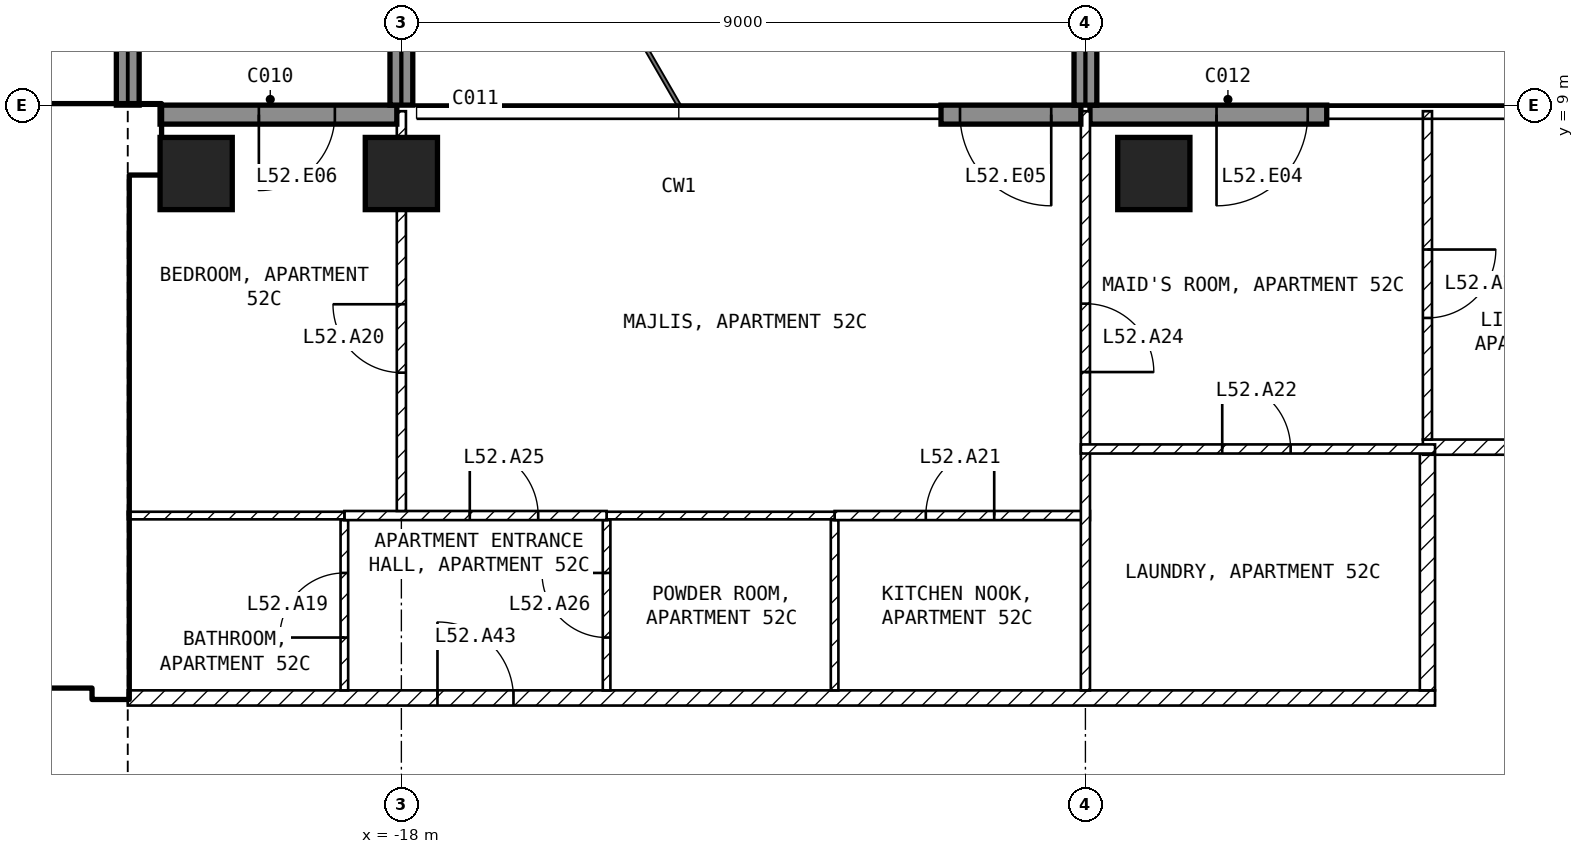
"""IFC4 building model, lengths in metres.
Left out: names, types, materials, properties, quantities, classifications, styles, units other than length and angle.
Written with IfcOpenShell. Run it as: python <this file> out.ifc"""

import sys

from ifc_helpers import new_model, si_unit, direction, frame, frame_2d, origin, origin_2d, place, context, subcontext, project, spatial, rectangle, extrude, element, fill, save


model = new_model("IFC4")
c1 = context("Model", 3, precision=1e-05, world=origin(), true_north=direction((0.0, 1.0)))
c2 = subcontext(c1, "Body", "Model", "MODEL_VIEW")
j1 = project(units=[si_unit("LENGTHUNIT", "METRE"), si_unit("PLANEANGLEUNIT", "RADIAN")], contexts=[c1])
p1 = place(None, origin())
s1 = spatial("IfcSite", under=j1, at=p1, CompositionType="ELEMENT")
p2 = place(p1, origin())
s2 = spatial("IfcBuilding", under=s1, at=p2, CompositionType="ELEMENT")
p3 = place(p2, frame((0.0, 0.0, 208.6)))
s3 = spatial("IfcBuildingStorey", under=s2, at=p3, CompositionType="ELEMENT", Elevation=208.6)
for number, where, z_axis, x_axis in (
    (1, (-20.7, 8.1, -0.25), (0.0, 0.0, 1.0), (1.0, 0.0, 0.0)),
    (2, (-18.0, 8.1, -0.25), (0.0, 0.0, 1.0), (1.0, 0.0, 0.0)),
    (3, (-8.1, 8.1, -0.25), (0.0, 0.0, 1.0), (1.0, 0.0, 0.0)),
):
    element("IfcColumn", number, at=place(p3, frame(where, z_axis=z_axis, x_axis=x_axis)), inside=s3, PredefinedType="COLUMN", context=c2, shape_type="SweptSolid", body=[
        extrude(rectangle(XDim=0.95, YDim=0.95, at=origin_2d()), origin(), (0.0, 0.0, 1.0), 3.5),
    ])
p4 = place(p3, frame((-5.825, 8.875, 0.0), z_axis=(0.0, 0.0, 1.0), x_axis=(-1.0, 0.0, 0.0)))
e4 = element("IfcWall", 4, at=p4, inside=s3, PredefinedType="SOLIDWALL", context=c2, shape_type="SweptSolid", body=[
    extrude(rectangle(XDim=3.115, YDim=0.25, at=frame_2d((1.558, 0.0))), origin(), (0.0, 0.0, 1.0), 3.25),
])
p5 = place(p4, frame((0.25, 0.0, 0.0)))
e5 = element("IfcOpeningElement", 5, at=p5, cuts=e4, PredefinedType="OPENING", context=c2, shape_type="SweptSolid", body=[
    extrude(rectangle(XDim=1.2, YDim=2.4, at=frame_2d((0.6, 1.2))), frame((0.0, 0.135, 0.0), z_axis=(0.0, -1.0, 0.0), x_axis=(1.0, 0.0, 0.0)), (0.0, 0.0, 1.0), 0.27),
])
p6 = place(p3, frame((-9.06, 8.875, 0.0), z_axis=(0.0, 0.0, 1.0), x_axis=(-1.0, 0.0, 0.0)))
e6 = element("IfcWall", 6, at=p6, inside=s3, PredefinedType="SOLIDWALL", context=c2, shape_type="SweptSolid", body=[
    extrude(rectangle(XDim=1.84, YDim=0.25, at=frame_2d((0.92, 0.0))), origin(), (0.0, 0.0, 1.0), 3.25),
])
p7 = place(p6, frame((0.39, 0.0, 0.0)))
e7 = element("IfcOpeningElement", 7, at=p7, cuts=e6, PredefinedType="OPENING", context=c2, shape_type="SweptSolid", body=[
    extrude(rectangle(XDim=1.2, YDim=2.4, at=frame_2d((0.6, 1.2))), frame((0.0, 0.135, 0.0), z_axis=(0.0, -1.0, 0.0), x_axis=(1.0, 0.0, 0.0)), (0.0, 0.0, 1.0), 0.27),
])
p8 = place(p3, frame((-18.06, 8.875, 0.0), z_axis=(0.0, 0.0, 1.0), x_axis=(-1.0, 0.0, 0.0)))
e8 = element("IfcWall", 8, at=p8, inside=s3, PredefinedType="SOLIDWALL", context=c2, shape_type="SweptSolid", body=[
    extrude(rectangle(XDim=3.115, YDim=0.25, at=frame_2d((1.558, 0.0))), origin(), (0.0, 0.0, 1.0), 3.25),
])
p9 = place(p8, frame((0.815, 0.0, 0.0)))
e9 = element("IfcOpeningElement", 9, at=p9, cuts=e8, PredefinedType="OPENING", context=c2, shape_type="SweptSolid", body=[
    extrude(rectangle(XDim=1.0, YDim=2.4, at=frame_2d((0.5, 1.2))), frame((0.0, 0.135, 0.0), z_axis=(0.0, -1.0, 0.0), x_axis=(1.0, 0.0, 0.0)), (0.0, 0.0, 1.0), 0.27),
])
for number, where, z_axis, x_axis in (
    (10, (-21.6, 9.0, 0.0), (0.0, 0.0, 1.0), (0.0, 1.0, 0.0)),
    (11, (-18.0, 9.0, 0.0), (0.0, 0.0, 1.0), (0.0, 1.0, 0.0)),
    (12, (-9.0, 9.0, 0.0), (0.0, 0.0, 1.0), (0.0, 1.0, 0.0)),
):
    element("IfcWall", number, at=place(p3, frame(where, z_axis=z_axis, x_axis=x_axis)), inside=s3, PredefinedType="SOLIDWALL", context=c2, shape_type="SweptSolid", body=[
        extrude(rectangle(XDim=2.7, YDim=0.3, at=frame_2d((1.35, 0.0))), origin(), (0.0, 0.0, 1.0), 3.25),
    ])
p10 = place(p3, frame((-29.6, 8.55, 0.0), z_axis=(0.0, 0.0, 1.0), x_axis=(1.0, 0.0, 0.0)))
e13 = element("IfcWall", 13, at=p10, inside=s3, PredefinedType="SHEAR", context=c2, shape_type="SweptSolid", body=[
    extrude(rectangle(XDim=8.425, YDim=0.9, at=frame_2d((4.212, 0.0))), origin(), (0.0, 0.0, 1.0), 3.25),
])
p11 = place(p3, frame((-21.825, 1.2, 0.0), z_axis=(0.0, 0.0, 1.0), x_axis=(0.0, 1.0, 0.0)))
e14 = element("IfcWall", 14, at=p11, inside=s3, PredefinedType="SHEAR", context=c2, shape_type="SweptSolid", body=[
    extrude(rectangle(XDim=6.9, YDim=0.45, at=frame_2d((3.45, 0.0))), origin(), (0.0, 0.0, 1.0), 3.25),
])
p12 = place(p3, frame((-33.2, 1.45, 0.0), z_axis=(0.0, 0.0, 1.0), x_axis=(1.0, 0.0, 0.0)))
e15 = element("IfcWall", 15, at=p12, inside=s3, PredefinedType="SOLIDWALL", context=c2, shape_type="SweptSolid", body=[
    extrude(rectangle(XDim=11.15, YDim=0.2, at=frame_2d((5.575, 0.0))), origin(), (0.0, 0.0, 1.0), 3.25),
])
p13 = place(p12, frame((9.4, 0.0, 0.0)))
e16 = element("IfcOpeningElement", 16, at=p13, cuts=e15, PredefinedType="OPENING", context=c2, shape_type="SweptSolid", body=[
    extrude(rectangle(XDim=1.0, YDim=2.1, at=frame_2d((0.5, 1.05))), frame((0.0, 0.11, 0.0), z_axis=(0.0, -1.0, 0.0), x_axis=(1.0, 0.0, 0.0)), (0.0, 0.0, 1.0), 0.22),
])
p14 = place(p12, frame((6.9, 0.0, 0.0)))
e17 = element("IfcOpeningElement", 17, at=p14, cuts=e15, PredefinedType="OPENING", context=c2, shape_type="SweptSolid", body=[
    extrude(rectangle(XDim=1.0, YDim=2.1, at=frame_2d((0.5, 1.05))), frame((0.0, 0.11, 0.0), z_axis=(0.0, -1.0, 0.0), x_axis=(1.0, 0.0, 0.0)), (0.0, 0.0, 1.0), 0.22),
])
p15 = place(p12, frame((1.1, 0.0, 0.0)))
e18 = element("IfcOpeningElement", 18, at=p15, cuts=e15, PredefinedType="OPENING", context=c2, shape_type="SweptSolid", body=[
    extrude(rectangle(XDim=0.9, YDim=2.1, at=frame_2d((0.45, 1.05))), frame((0.0, 0.11, 0.0), z_axis=(0.0, -1.0, 0.0), x_axis=(1.0, 0.0, 0.0)), (0.0, 0.0, 1.0), 0.22),
])
p16 = place(p3, frame((-28.35, 5.15, 0.0), z_axis=(0.0, 0.0, 1.0), x_axis=(1.0, 0.0, 0.0)))
e19 = element("IfcWall", 19, at=p16, inside=s3, PredefinedType="SOLIDWALL", context=c2, shape_type="SweptSolid", body=[
    extrude(rectangle(XDim=6.3, YDim=0.2, at=frame_2d((3.15, 0.0))), origin(), (0.0, 0.0, 1.0), 3.25),
])
p17 = place(p16, frame((5.1, 0.0, 0.0)))
e20 = element("IfcOpeningElement", 20, at=p17, cuts=e19, PredefinedType="OPENING", context=c2, shape_type="SweptSolid", body=[
    extrude(rectangle(XDim=1.0, YDim=2.1, at=frame_2d((0.5, 1.05))), frame((0.0, 0.11, 0.0), z_axis=(0.0, -1.0, 0.0), x_axis=(1.0, 0.0, 0.0)), (0.0, 0.0, 1.0), 0.22),
])
p18 = place(p3, frame((-21.6, 1.2, 0.0), z_axis=(0.0, 0.0, 1.0), x_axis=(1.0, 0.0, 0.0)))
e21 = element("IfcWall", 21, at=p18, inside=s3, PredefinedType="PARTITIONING", context=c2, shape_type="SweptSolid", body=[
    extrude(rectangle(XDim=17.2, YDim=0.2, at=frame_2d((8.6, 0.0))), origin(), (0.0, 0.0, 1.0), 3.25),
])
p19 = place(p18, frame((4.075, 0.0, 0.0)))
e22 = element("IfcOpeningElement", 22, at=p19, cuts=e21, PredefinedType="OPENING", context=c2, shape_type="SweptSolid", body=[
    extrude(rectangle(XDim=1.0, YDim=2.1, at=frame_2d((0.5, 1.05))), frame((0.0, 0.11, 0.0), z_axis=(0.0, -1.0, 0.0), x_axis=(1.0, 0.0, 0.0)), (0.0, 0.0, 1.0), 0.22),
])
p20 = place(p3, frame((-4.5, 1.3, 0.0), z_axis=(0.0, 0.0, 1.0), x_axis=(0.0, 1.0, 0.0)))
e23 = element("IfcWall", 23, at=p20, inside=s3, PredefinedType="PARTITIONING", context=c2, shape_type="SweptSolid", body=[
    extrude(rectangle(XDim=3.116, YDim=0.2, at=frame_2d((1.558, 0.0))), origin(), (0.0, 0.0, 1.0), 3.25),
])
p21 = place(p3, frame((-4.56, 4.5, 0.0), z_axis=(0.0, 0.0, 1.0), x_axis=(1.0, 0.0, 0.0)))
e24 = element("IfcWall", 24, at=p21, inside=s3, PredefinedType="PARTITIONING", context=c2, shape_type="SweptSolid", body=[
    extrude(rectangle(XDim=3.46, YDim=0.2, at=frame_2d((1.73, 0.0))), origin(), (0.0, 0.0, 1.0), 3.25),
])
p22 = place(p3, frame((-12.3, 1.3, 0.0), z_axis=(0.0, 0.0, 1.0), x_axis=(0.0, 1.0, 0.0)))
e25 = element("IfcWall", 25, at=p22, inside=s3, PredefinedType="PARTITIONING", context=c2, shape_type="SweptSolid", body=[
    extrude(rectangle(XDim=2.24, YDim=0.1, at=frame_2d((1.12, 0.0))), origin(), (0.0, 0.0, 1.0), 3.25),
])
p23 = place(p3, frame((-12.3, 3.6, 0.0), z_axis=(0.0, 0.0, 1.0), x_axis=(1.0, 0.0, 0.0)))
e26 = element("IfcWall", 26, at=p23, inside=s3, PredefinedType="PARTITIONING", context=c2, shape_type="SweptSolid", body=[
    extrude(rectangle(XDim=3.36, YDim=0.12, at=frame_2d((1.68, 0.0))), origin(), (0.0, 0.0, 1.0), 3.25),
])
p24 = place(p23, frame((1.2, 0.0, 0.0)))
e27 = element("IfcOpeningElement", 27, at=p24, cuts=e26, PredefinedType="OPENING", context=c2, shape_type="SweptSolid", body=[
    extrude(rectangle(XDim=0.9, YDim=2.1, at=frame_2d((0.45, 1.05))), frame((0.0, 0.07, 0.0), z_axis=(0.0, -1.0, 0.0), x_axis=(1.0, 0.0, 0.0)), (0.0, 0.0, 1.0), 0.14),
])
p25 = place(p3, frame((-9.0, 8.92, 0.0), z_axis=(0.0, 0.0, 1.0), x_axis=(0.0, -1.0, 0.0)))
e28 = element("IfcWall", 28, at=p25, inside=s3, PredefinedType="PARTITIONING", context=c2, shape_type="SweptSolid", body=[
    extrude(rectangle(XDim=7.62, YDim=0.12, at=frame_2d((3.81, 0.0))), origin(), (0.0, 0.0, 1.0), 3.25),
])
p26 = place(p25, frame((2.532, 0.0, 0.0)))
e29 = element("IfcOpeningElement", 29, at=p26, cuts=e28, PredefinedType="OPENING", context=c2, shape_type="SweptSolid", body=[
    extrude(rectangle(XDim=0.9, YDim=2.1, at=frame_2d((0.45, 1.05))), frame((0.0, 0.07, 0.0), z_axis=(0.0, -1.0, 0.0), x_axis=(1.0, 0.0, 0.0)), (0.0, 0.0, 1.0), 0.14),
])
p27 = place(p3, frame((-15.3, 1.3, 0.0), z_axis=(0.0, 0.0, 1.0), x_axis=(0.0, 1.0, 0.0)))
e30 = element("IfcWall", 30, at=p27, inside=s3, PredefinedType="PARTITIONING", context=c2, shape_type="SweptSolid", body=[
    extrude(rectangle(XDim=2.24, YDim=0.1, at=frame_2d((1.12, 0.0))), origin(), (0.0, 0.0, 1.0), 3.25),
])
p28 = place(p27, frame((0.695, 0.0, 0.0)))
e31 = element("IfcOpeningElement", 31, at=p28, cuts=e30, PredefinedType="OPENING", context=c2, shape_type="SweptSolid", body=[
    extrude(rectangle(XDim=0.85, YDim=2.1, at=frame_2d((0.425, 1.05))), frame((0.0, 0.06, 0.0), z_axis=(0.0, -1.0, 0.0), x_axis=(1.0, 0.0, 0.0)), (0.0, 0.0, 1.0), 0.12),
])
p29 = place(p3, frame((-15.3, 3.6, 0.0), z_axis=(0.0, 0.0, 1.0), x_axis=(1.0, 0.0, 0.0)))
e32 = element("IfcWall", 32, at=p29, inside=s3, PredefinedType="PARTITIONING", context=c2, shape_type="SweptSolid", body=[
    extrude(rectangle(XDim=3.0, YDim=0.1, at=frame_2d((1.5, 0.0))), origin(), (0.0, 0.0, 1.0), 3.25),
])
p30 = place(p3, frame((-18.75, 1.3, 0.0), z_axis=(0.0, 0.0, 1.0), x_axis=(0.0, 1.0, 0.0)))
e33 = element("IfcWall", 33, at=p30, inside=s3, PredefinedType="PARTITIONING", context=c2, shape_type="SweptSolid", body=[
    extrude(rectangle(XDim=2.24, YDim=0.1, at=frame_2d((1.12, 0.0))), origin(), (0.0, 0.0, 1.0), 3.25),
])
p31 = place(p30, frame((0.695, 0.0, 0.0)))
e34 = element("IfcOpeningElement", 34, at=p31, cuts=e33, PredefinedType="OPENING", context=c2, shape_type="SweptSolid", body=[
    extrude(rectangle(XDim=0.85, YDim=2.1, at=frame_2d((0.425, 1.05))), frame((0.0, 0.06, 0.0), z_axis=(0.0, -1.0, 0.0), x_axis=(1.0, 0.0, 0.0)), (0.0, 0.0, 1.0), 0.12),
])
p32 = place(p3, frame((-18.75, 3.6, 0.0), z_axis=(0.0, 0.0, 1.0), x_axis=(1.0, 0.0, 0.0)))
e35 = element("IfcWall", 35, at=p32, inside=s3, PredefinedType="PARTITIONING", context=c2, shape_type="SweptSolid", body=[
    extrude(rectangle(XDim=3.45, YDim=0.12, at=frame_2d((1.725, 0.0))), origin(), (0.0, 0.0, 1.0), 3.25),
])
p33 = place(p32, frame((1.65, 0.0, 0.0)))
e36 = element("IfcOpeningElement", 36, at=p33, cuts=e35, PredefinedType="OPENING", context=c2, shape_type="SweptSolid", body=[
    extrude(rectangle(XDim=0.9, YDim=2.1, at=frame_2d((0.45, 1.05))), frame((0.0, 0.07, 0.0), z_axis=(0.0, -1.0, 0.0), x_axis=(1.0, 0.0, 0.0)), (0.0, 0.0, 1.0), 0.14),
])
p34 = place(p3, frame((-21.6, 3.6, 0.0), z_axis=(0.0, 0.0, 1.0), x_axis=(1.0, 0.0, 0.0)))
e37 = element("IfcWall", 37, at=p34, inside=s3, PredefinedType="PARTITIONING", context=c2, shape_type="SweptSolid", body=[
    extrude(rectangle(XDim=2.85, YDim=0.1, at=frame_2d((1.425, 0.0))), origin(), (0.0, 0.0, 1.0), 3.25),
])
p35 = place(p3, frame((-18.0, 3.66, 0.0), z_axis=(0.0, 0.0, 1.0), x_axis=(0.0, 1.0, 0.0)))
e38 = element("IfcWall", 38, at=p35, inside=s3, PredefinedType="PARTITIONING", context=c2, shape_type="SweptSolid", body=[
    extrude(rectangle(XDim=5.26, YDim=0.12, at=frame_2d((2.63, 0.0))), origin(), (0.0, 0.0, 1.0), 2.48),
])
p36 = place(p35, frame((1.82, 0.0, 0.0)))
e39 = element("IfcOpeningElement", 39, at=p36, cuts=e38, PredefinedType="OPENING", context=c2, shape_type="SweptSolid", body=[
    extrude(rectangle(XDim=0.9, YDim=2.1, at=frame_2d((0.45, 1.05))), frame((0.0, 0.07, 0.0), z_axis=(0.0, -1.0, 0.0), x_axis=(1.0, 0.0, 0.0)), (0.0, 0.0, 1.0), 0.14),
])
p37 = place(p3, frame((-9.06, 4.476, 0.0), z_axis=(0.0, 0.0, 1.0), x_axis=(1.0, 0.0, 0.0)))
e40 = element("IfcWall", 40, at=p37, inside=s3, PredefinedType="PARTITIONING", context=c2, shape_type="SweptSolid", body=[
    extrude(rectangle(XDim=4.66, YDim=0.12, at=frame_2d((2.33, 0.0))), origin(), (0.0, 0.0, 1.0), 3.25),
])
p38 = place(p37, frame((1.86, 0.0, 0.0)))
e41 = element("IfcOpeningElement", 41, at=p38, cuts=e40, PredefinedType="OPENING", context=c2, shape_type="SweptSolid", body=[
    extrude(rectangle(XDim=0.9, YDim=2.1, at=frame_2d((0.45, 1.05))), frame((0.0, 0.07, 0.0), z_axis=(0.0, -1.0, 0.0), x_axis=(1.0, 0.0, 0.0)), (0.0, 0.0, 1.0), 0.14),
])
p39 = place(p3, frame((-4.5, 8.92, 0.0), z_axis=(0.0, 0.0, 1.0), x_axis=(0.0, -1.0, 0.0)))
e42 = element("IfcWall", 42, at=p39, inside=s3, PredefinedType="PARTITIONING", context=c2, shape_type="SweptSolid", body=[
    extrude(rectangle(XDim=4.32, YDim=0.12, at=frame_2d((2.16, 0.0))), origin(), (0.0, 0.0, 1.0), 3.25),
])
p40 = place(p39, frame((1.82, 0.0, 0.0)))
e43 = element("IfcOpeningElement", 43, at=p40, cuts=e42, PredefinedType="OPENING", context=c2, shape_type="SweptSolid", body=[
    extrude(rectangle(XDim=0.9, YDim=2.1, at=frame_2d((0.45, 1.05))), frame((0.0, 0.07, 0.0), z_axis=(0.0, -1.0, 0.0), x_axis=(1.0, 0.0, 0.0)), (0.0, 0.0, 1.0), 0.14),
])
p41 = place(p5, origin())
e44 = element("IfcDoor", 44, at=p41, inside=s3, OperationType="SINGLE_SWING_RIGHT", PredefinedType="DOOR", context=c2, shape_type="SweptSolid", body=[
    extrude(rectangle(XDim=1.2, YDim=2.4, at=frame_2d((0.6, 1.2))), frame((0.0, 0.025, 0.0), z_axis=(0.0, -1.0, 0.0), x_axis=(1.0, 0.0, 0.0)), (0.0, 0.0, 1.0), 0.05),
])
fill(e5, e44)
p42 = place(p7, origin())
e45 = element("IfcDoor", 45, at=p42, inside=s3, OperationType="SINGLE_SWING_LEFT", PredefinedType="DOOR", context=c2, shape_type="SweptSolid", body=[
    extrude(rectangle(XDim=1.2, YDim=2.4, at=frame_2d((0.6, 1.2))), frame((0.0, 0.025, 0.0), z_axis=(0.0, -1.0, 0.0), x_axis=(1.0, 0.0, 0.0)), (0.0, 0.0, 1.0), 0.05),
])
fill(e7, e45)
p43 = place(p9, origin())
e46 = element("IfcDoor", 46, at=p43, inside=s3, OperationType="SINGLE_SWING_RIGHT", PredefinedType="DOOR", context=c2, shape_type="SweptSolid", body=[
    extrude(rectangle(XDim=1.0, YDim=2.4, at=frame_2d((0.5, 1.2))), frame((0.0, 0.025, 0.0), z_axis=(0.0, -1.0, 0.0), x_axis=(1.0, 0.0, 0.0)), (0.0, 0.0, 1.0), 0.05),
])
fill(e9, e46)
p44 = place(p17, origin())
e47 = element("IfcDoor", 47, at=p44, inside=s3, OperationType="SINGLE_SWING_LEFT", PredefinedType="DOOR", context=c2, shape_type="SweptSolid", body=[
    extrude(rectangle(XDim=1.0, YDim=2.1, at=frame_2d((0.5, 1.05))), frame((0.0, 0.025, 0.0), z_axis=(0.0, -1.0, 0.0), x_axis=(1.0, 0.0, 0.0)), (0.0, 0.0, 1.0), 0.05),
])
fill(e20, e47)
p45 = place(p31, origin())
e48 = element("IfcDoor", 48, at=p45, inside=s3, OperationType="SINGLE_SWING_LEFT", PredefinedType="DOOR", context=c2, shape_type="SweptSolid", body=[
    extrude(rectangle(XDim=0.85, YDim=2.1, at=frame_2d((0.425, 1.05))), frame((0.0, 0.025, 0.0), z_axis=(0.0, -1.0, 0.0), x_axis=(1.0, 0.0, 0.0)), (0.0, 0.0, 1.0), 0.05),
])
fill(e34, e48)
p46 = place(p36, origin())
e49 = element("IfcDoor", 49, at=p46, inside=s3, OperationType="SINGLE_SWING_RIGHT", PredefinedType="DOOR", context=c2, shape_type="SweptSolid", body=[
    extrude(rectangle(XDim=0.9, YDim=2.1, at=frame_2d((0.45, 1.05))), frame((0.0, 0.025, 0.0), z_axis=(0.0, -1.0, 0.0), x_axis=(1.0, 0.0, 0.0)), (0.0, 0.0, 1.0), 0.05),
])
fill(e39, e49)
p47 = place(p24, origin())
e50 = element("IfcDoor", 50, at=p47, inside=s3, OperationType="SINGLE_SWING_RIGHT", PredefinedType="DOOR", context=c2, shape_type="SweptSolid", body=[
    extrude(rectangle(XDim=0.9, YDim=2.1, at=frame_2d((0.45, 1.05))), frame((0.0, 0.025, 0.0), z_axis=(0.0, -1.0, 0.0), x_axis=(1.0, 0.0, 0.0)), (0.0, 0.0, 1.0), 0.05),
])
fill(e27, e50)
p48 = place(p38, origin())
e51 = element("IfcDoor", 51, at=p48, inside=s3, OperationType="SINGLE_SWING_LEFT", PredefinedType="DOOR", context=c2, shape_type="SweptSolid", body=[
    extrude(rectangle(XDim=0.9, YDim=2.1, at=frame_2d((0.45, 1.05))), frame((0.0, 0.025, 0.0), z_axis=(0.0, -1.0, 0.0), x_axis=(1.0, 0.0, 0.0)), (0.0, 0.0, 1.0), 0.05),
])
fill(e41, e51)
p49 = place(p40, origin())
e52 = element("IfcDoor", 52, at=p49, inside=s3, OperationType="SINGLE_SWING_LEFT", PredefinedType="DOOR", context=c2, shape_type="SweptSolid", body=[
    extrude(rectangle(XDim=0.9, YDim=2.1, at=frame_2d((0.45, 1.05))), frame((0.0, 0.025, 0.0), z_axis=(0.0, -1.0, 0.0), x_axis=(1.0, 0.0, 0.0)), (0.0, 0.0, 1.0), 0.05),
])
fill(e43, e52)
p50 = place(p26, origin())
e53 = element("IfcDoor", 53, at=p50, inside=s3, OperationType="SINGLE_SWING_RIGHT", PredefinedType="DOOR", context=c2, shape_type="SweptSolid", body=[
    extrude(rectangle(XDim=0.9, YDim=2.1, at=frame_2d((0.45, 1.05))), frame((0.0, 0.025, 0.0), z_axis=(0.0, -1.0, 0.0), x_axis=(1.0, 0.0, 0.0)), (0.0, 0.0, 1.0), 0.05),
])
fill(e29, e53)
p51 = place(p33, origin())
e54 = element("IfcDoor", 54, at=p51, inside=s3, OperationType="SINGLE_SWING_LEFT", PredefinedType="DOOR", context=c2, shape_type="SweptSolid", body=[
    extrude(rectangle(XDim=0.9, YDim=2.1, at=frame_2d((0.45, 1.05))), frame((0.0, 0.025, 0.0), z_axis=(0.0, -1.0, 0.0), x_axis=(1.0, 0.0, 0.0)), (0.0, 0.0, 1.0), 0.05),
])
fill(e36, e54)
p52 = place(p28, origin())
e55 = element("IfcDoor", 55, at=p52, inside=s3, OperationType="SINGLE_SWING_RIGHT", PredefinedType="DOOR", context=c2, shape_type="SweptSolid", body=[
    extrude(rectangle(XDim=0.85, YDim=2.1, at=frame_2d((0.425, 1.05))), frame((0.0, 0.025, 0.0), z_axis=(0.0, -1.0, 0.0), x_axis=(1.0, 0.0, 0.0)), (0.0, 0.0, 1.0), 0.05),
])
fill(e31, e55)
p53 = place(p19, origin())
e56 = element("IfcDoor", 56, at=p53, inside=s3, OperationType="SINGLE_SWING_LEFT", PredefinedType="DOOR", context=c2, shape_type="SweptSolid", body=[
    extrude(rectangle(XDim=1.0, YDim=2.1, at=frame_2d((0.5, 1.05))), frame((0.0, 0.025, 0.0), z_axis=(0.0, -1.0, 0.0), x_axis=(1.0, 0.0, 0.0)), (0.0, 0.0, 1.0), 0.05),
])
fill(e22, e56)
save(model, sys.argv[1])
